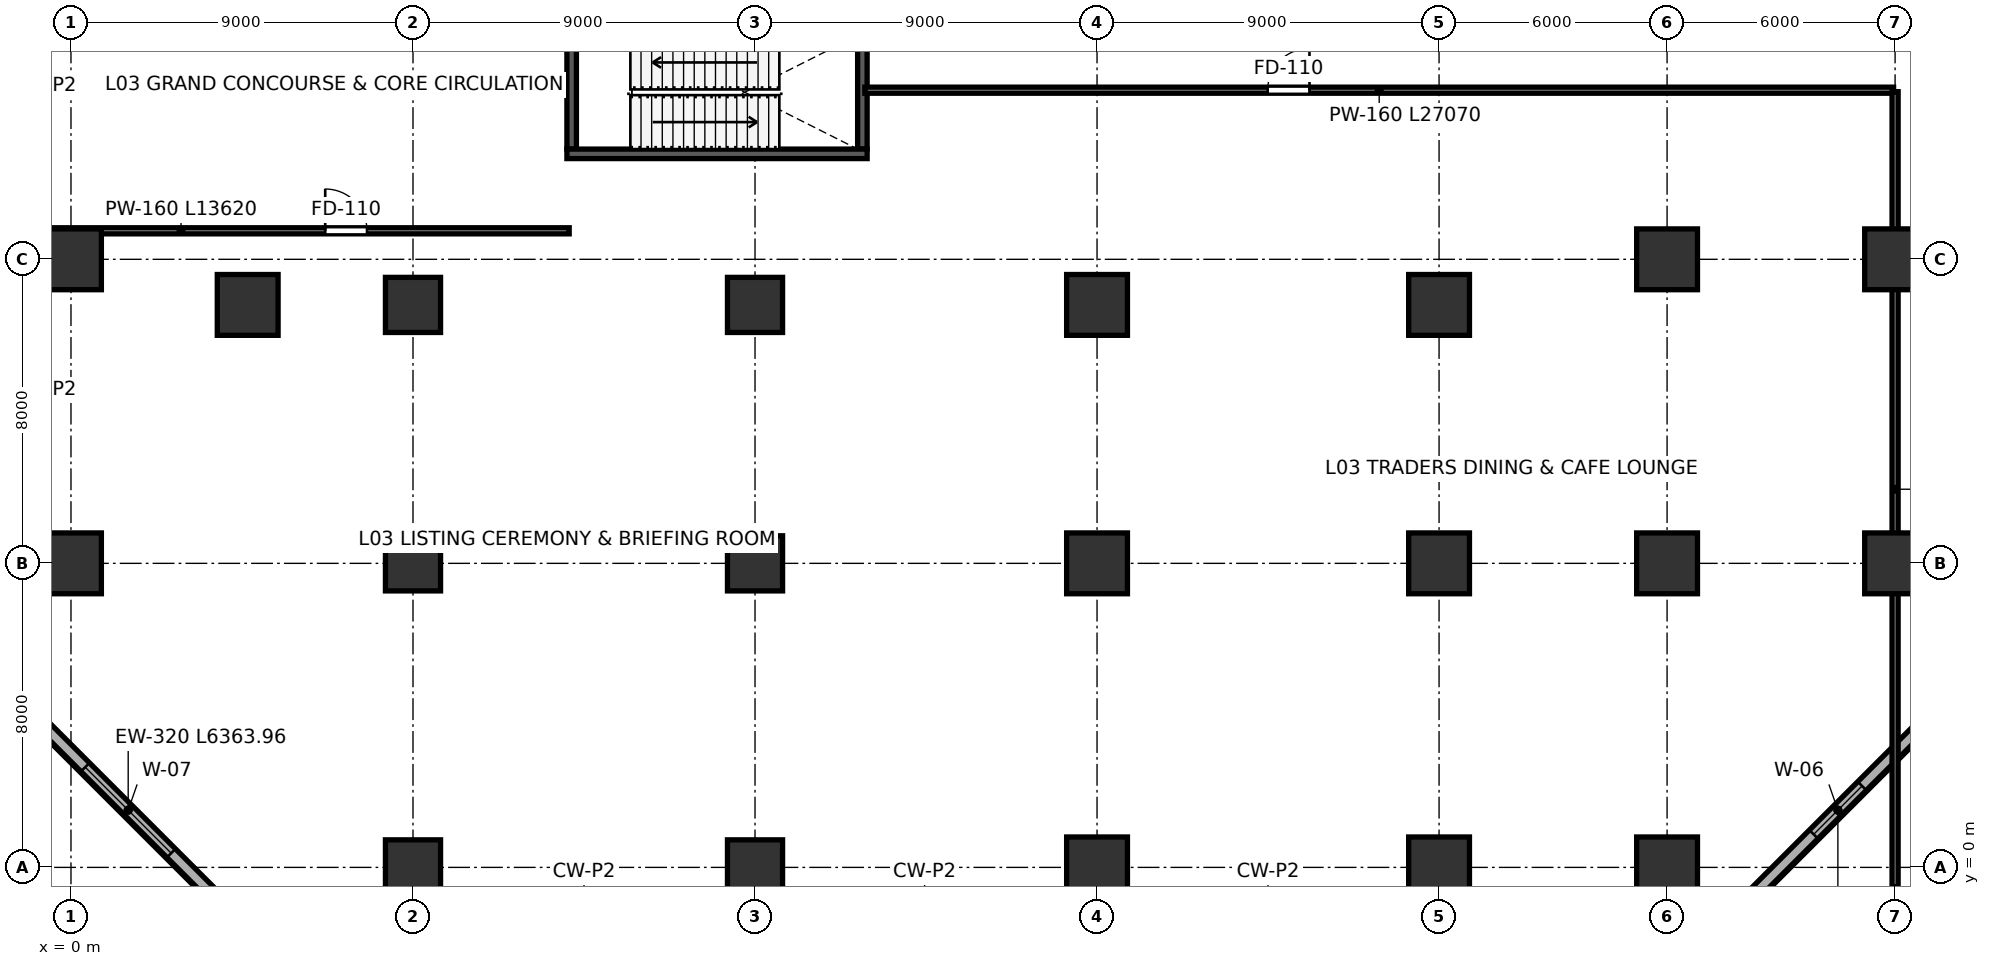
"""IFC4 building model, lengths in metres.
Left out: names, types, materials, properties, quantities, classifications, styles, units other than length and angle.
Written with IfcOpenShell. Run it as: python <this file> out.ifc"""

import sys

from ifc_helpers import new_model, si_unit, direction, frame, frame_2d, origin, origin_2d, place, context, subcontext, project, spatial, rectangle, extrude, source, transform, mapped, element, fill, save


model = new_model("IFC4")
c1 = context("Model", 3, precision=1e-05, world=origin(), true_north=direction((0.0, 1.0)))
c2 = subcontext(c1, "Body", "Model", "MODEL_VIEW")
j1 = project(units=[si_unit("LENGTHUNIT", "METRE"), si_unit("PLANEANGLEUNIT", "RADIAN")], contexts=[c1])
p1 = place(None, origin())
s1 = spatial("IfcSite", under=j1, at=p1, CompositionType="ELEMENT")
p2 = place(p1, origin())
s2 = spatial("IfcBuilding", under=s1, at=p2, CompositionType="ELEMENT")
p3 = place(p2, frame((0.0, 0.0, 12.0)))
s3 = spatial("IfcBuildingStorey", under=s2, at=p3, CompositionType="ELEMENT", Elevation=12.0)
m1 = source(origin(), c2, "Body", "SweptSolid", [
    extrude(rectangle(XDim=1.6, YDim=1.6, at=origin_2d()), origin(), (0.0, 0.0, 1.0), 5.398),
])
for number, where, z_axis, x_axis in (
    (1, (0.0, 8.0, 0.001), (0.0, 0.0, 1.0), (1.0, 0.0, 0.0)),
    (2, (0.0, 16.0, 0.001), (0.0, 0.0, 1.0), (1.0, 0.0, 0.0)),
):
    element("IfcColumn", number, at=place(p3, frame(where, z_axis=z_axis, x_axis=x_axis)), inside=s3, PredefinedType="COLUMN", context=c2, shape_type="MappedRepresentation", body=[
        mapped(m1, transform((0.0, 0.0, 0.0), scale=1.0)),
    ])
m2 = source(origin(), c2, "Body", "SweptSolid", [
    extrude(rectangle(XDim=1.45, YDim=1.45, at=origin_2d()), origin(), (0.0, 0.0, 1.0), 5.398),
])
p4 = place(p3, frame((9.0, 0.0, 0.001), z_axis=(0.0, 0.0, 1.0), x_axis=(1.0, 0.0, 0.0)))
e3 = element("IfcColumn", 3, at=p4, inside=s3, PredefinedType="COLUMN", context=c2, shape_type="MappedRepresentation", body=[
    mapped(m2, transform((0.0, 0.0, 0.0), scale=1.0)),
])
m3 = source(origin(), c2, "Body", "SweptSolid", [
    extrude(rectangle(XDim=1.45, YDim=1.45, at=origin_2d()), origin(), (0.0, 0.0, 1.0), 5.398),
])
for number, where, z_axis, x_axis in (
    (4, (9.0, 8.0, 0.001), (0.0, 0.0, 1.0), (1.0, 0.0, 0.0)),
    (5, (9.0, 14.8, 0.001), (0.0, 0.0, 1.0), (1.0, 0.0, 0.0)),
):
    element("IfcColumn", number, at=place(p3, frame(where, z_axis=z_axis, x_axis=x_axis)), inside=s3, PredefinedType="COLUMN", context=c2, shape_type="MappedRepresentation", body=[
        mapped(m3, transform((0.0, 0.0, 0.0), scale=1.0)),
    ])
p5 = place(p3, frame((18.0, 0.0, 0.001), z_axis=(0.0, 0.0, 1.0), x_axis=(1.0, 0.0, 0.0)))
e6 = element("IfcColumn", 6, at=p5, inside=s3, PredefinedType="COLUMN", context=c2, shape_type="MappedRepresentation", body=[
    mapped(m2, transform((0.0, 0.0, 0.0), scale=1.0)),
])
for number, where, z_axis, x_axis in (
    (7, (18.0, 8.0, 0.001), (0.0, 0.0, 1.0), (1.0, 0.0, 0.0)),
    (8, (18.0, 14.8, 0.001), (0.0, 0.0, 1.0), (1.0, 0.0, 0.0)),
):
    element("IfcColumn", number, at=place(p3, frame(where, z_axis=z_axis, x_axis=x_axis)), inside=s3, PredefinedType="COLUMN", context=c2, shape_type="MappedRepresentation", body=[
        mapped(m3, transform((0.0, 0.0, 0.0), scale=1.0)),
    ])
p6 = place(p3, frame((27.0, 0.0, 0.001), z_axis=(0.0, 0.0, 1.0), x_axis=(1.0, 0.0, 0.0)))
e9 = element("IfcColumn", 9, at=p6, inside=s3, PredefinedType="COLUMN", context=c2, shape_type="MappedRepresentation", body=[
    mapped(m1, transform((0.0, 0.0, 0.0), scale=1.0)),
])
m4 = source(origin(), c2, "Body", "SweptSolid", [
    extrude(rectangle(XDim=1.6, YDim=1.6, at=origin_2d()), origin(), (0.0, 0.0, 1.0), 5.398),
])
for number, where, z_axis, x_axis in (
    (10, (27.0, 8.0, 0.001), (0.0, 0.0, 1.0), (1.0, 0.0, 0.0)),
    (11, (27.0, 14.8, 0.001), (0.0, 0.0, 1.0), (1.0, 0.0, 0.0)),
):
    element("IfcColumn", number, at=place(p3, frame(where, z_axis=z_axis, x_axis=x_axis)), inside=s3, PredefinedType="COLUMN", context=c2, shape_type="MappedRepresentation", body=[
        mapped(m4, transform((0.0, 0.0, 0.0), scale=1.0)),
    ])
p7 = place(p3, frame((36.0, 0.0, 0.001), z_axis=(0.0, 0.0, 1.0), x_axis=(1.0, 0.0, 0.0)))
e12 = element("IfcColumn", 12, at=p7, inside=s3, PredefinedType="COLUMN", context=c2, shape_type="MappedRepresentation", body=[
    mapped(m1, transform((0.0, 0.0, 0.0), scale=1.0)),
])
for number, where, z_axis, x_axis in (
    (13, (36.0, 8.0, 0.001), (0.0, 0.0, 1.0), (1.0, 0.0, 0.0)),
    (14, (36.0, 14.8, 0.001), (0.0, 0.0, 1.0), (1.0, 0.0, 0.0)),
):
    element("IfcColumn", number, at=place(p3, frame(where, z_axis=z_axis, x_axis=x_axis)), inside=s3, PredefinedType="COLUMN", context=c2, shape_type="MappedRepresentation", body=[
        mapped(m4, transform((0.0, 0.0, 0.0), scale=1.0)),
    ])
p8 = place(p3, frame((42.0, 0.0, 0.001), z_axis=(0.0, 0.0, 1.0), x_axis=(1.0, 0.0, 0.0)))
e15 = element("IfcColumn", 15, at=p8, inside=s3, PredefinedType="COLUMN", context=c2, shape_type="MappedRepresentation", body=[
    mapped(m1, transform((0.0, 0.0, 0.0), scale=1.0)),
])
for number, where, z_axis, x_axis in (
    (16, (42.0, 8.0, 0.001), (0.0, 0.0, 1.0), (1.0, 0.0, 0.0)),
    (17, (42.0, 16.0, 0.001), (0.0, 0.0, 1.0), (1.0, 0.0, 0.0)),
):
    element("IfcColumn", number, at=place(p3, frame(where, z_axis=z_axis, x_axis=x_axis)), inside=s3, PredefinedType="COLUMN", context=c2, shape_type="MappedRepresentation", body=[
        mapped(m4, transform((0.0, 0.0, 0.0), scale=1.0)),
    ])
for number, where, z_axis, x_axis in (
    (18, (48.0, 8.0, 0.001), (0.0, 0.0, 1.0), (1.0, 0.0, 0.0)),
    (19, (48.0, 16.0, 0.001), (0.0, 0.0, 1.0), (1.0, 0.0, 0.0)),
):
    element("IfcColumn", number, at=place(p3, frame(where, z_axis=z_axis, x_axis=x_axis)), inside=s3, PredefinedType="COLUMN", context=c2, shape_type="MappedRepresentation", body=[
        mapped(m1, transform((0.0, 0.0, 0.0), scale=1.0)),
    ])
p9 = place(p3, frame((4.65, 14.8, 0.001), z_axis=(0.0, 0.0, 1.0), x_axis=(1.0, 0.0, 0.0)))
e20 = element("IfcColumn", 20, at=p9, inside=s3, PredefinedType="COLUMN", context=c2, shape_type="MappedRepresentation", body=[
    mapped(m4, transform((0.0, 0.0, 0.0), scale=1.0)),
])
p10 = place(p3, frame((44.244, -0.744, 0.0), z_axis=(0.0, 0.0, 1.0), x_axis=(0.707106781187, 0.707106781187, 0.0)))
e21 = element("IfcWall", 21, at=p10, inside=s3, PredefinedType="SOLIDWALL", context=c2, shape_type="SweptSolid", body=[
    extrude(rectangle(XDim=6.364, YDim=0.32, at=frame_2d((3.182, 0.0))), origin(), (0.0, 0.0, 1.0), 5.14),
])
p11 = place(p10, frame((2.282, 0.0, 0.65)))
e22 = element("IfcOpeningElement", 22, at=p11, cuts=e21, PredefinedType="OPENING", context=c2, shape_type="SweptSolid", body=[
    extrude(rectangle(XDim=1.8, YDim=2.1, at=frame_2d((0.9, 1.05))), frame((0.0, 0.17, 0.0), z_axis=(0.0, -1.0, 0.0), x_axis=(1.0, 0.0, 0.0)), (0.0, 0.0, 1.0), 0.34),
])
p12 = place(p3, frame((-0.744, 3.756, 0.0), z_axis=(0.0, 0.0, 1.0), x_axis=(0.707106781187, -0.707106781187, 0.0)))
e23 = element("IfcWall", 23, at=p12, inside=s3, PredefinedType="SOLIDWALL", context=c2, shape_type="SweptSolid", body=[
    extrude(rectangle(XDim=6.364, YDim=0.32, at=frame_2d((3.182, 0.0))), origin(), (0.0, 0.0, 1.0), 5.14),
])
p13 = place(p12, frame((1.582, 0.0, 0.65)))
e24 = element("IfcOpeningElement", 24, at=p13, cuts=e23, PredefinedType="OPENING", context=c2, shape_type="SweptSolid", body=[
    extrude(rectangle(XDim=3.2, YDim=2.5, at=frame_2d((1.6, 1.25))), frame((0.0, 0.17, 0.0), z_axis=(0.0, -1.0, 0.0), x_axis=(1.0, 0.0, 0.0)), (0.0, 0.0, 1.0), 0.34),
])
for number, where, z_axis, x_axis in (
    (25, (13.175, 18.9, 0.0), (0.0, 0.0, 1.0), (0.0, 1.0, 0.0)),
    (26, (20.825, 18.9, 0.0), (0.0, 0.0, 1.0), (0.0, 1.0, 0.0)),
):
    element("IfcWall", number, at=place(p3, frame(where, z_axis=z_axis, x_axis=x_axis)), inside=s3, PredefinedType="SHEAR", context=c2, shape_type="SweptSolid", body=[
        extrude(rectangle(XDim=2.99, YDim=0.25, at=frame_2d((1.495, 0.0))), origin(), (0.0, 0.0, 1.0), 5.14),
    ])
p14 = place(p3, frame((13.05, 18.775, 0.0), z_axis=(0.0, 0.0, 1.0), x_axis=(1.0, 0.0, 0.0)))
e27 = element("IfcWall", 27, at=p14, inside=s3, PredefinedType="SHEAR", context=c2, shape_type="SweptSolid", body=[
    extrude(rectangle(XDim=7.9, YDim=0.25, at=frame_2d((3.95, 0.0))), origin(), (0.0, 0.0, 1.0), 5.14),
])
p15 = place(p3, frame((-0.51, 16.75, 0.0), z_axis=(0.0, 0.0, 1.0), x_axis=(1.0, 0.0, 0.0)))
e28 = element("IfcWall", 28, at=p15, inside=s3, PredefinedType="PARTITIONING", context=c2, shape_type="SweptSolid", body=[
    extrude(rectangle(XDim=13.62, YDim=0.16, at=frame_2d((6.81, 0.0))), origin(), (0.0, 0.0, 1.0), 4.27),
])
p16 = place(p15, frame((7.2, 0.0, 0.0)))
e29 = element("IfcOpeningElement", 29, at=p16, cuts=e28, PredefinedType="OPENING", context=c2, shape_type="SweptSolid", body=[
    extrude(rectangle(XDim=1.1, YDim=2.2, at=frame_2d((0.55, 1.1))), frame((0.0, 0.09, 0.0), z_axis=(0.0, -1.0, 0.0), x_axis=(1.0, 0.0, 0.0)), (0.0, 0.0, 1.0), 0.18),
])
p17 = place(p3, frame((20.89, 20.45, 0.0), z_axis=(0.0, 0.0, 1.0), x_axis=(1.0, 0.0, 0.0)))
e30 = element("IfcWall", 30, at=p17, inside=s3, PredefinedType="PARTITIONING", context=c2, shape_type="SweptSolid", body=[
    extrude(rectangle(XDim=27.07, YDim=0.16, at=frame_2d((13.535, 0.0))), origin(), (0.0, 0.0, 1.0), 4.27),
])
p18 = place(p17, frame((10.6, 0.0, 0.0)))
e31 = element("IfcOpeningElement", 31, at=p18, cuts=e30, PredefinedType="OPENING", context=c2, shape_type="SweptSolid", body=[
    extrude(rectangle(XDim=1.1, YDim=2.2, at=frame_2d((0.55, 1.1))), frame((0.0, 0.09, 0.0), z_axis=(0.0, -1.0, 0.0), x_axis=(1.0, 0.0, 0.0)), (0.0, 0.0, 1.0), 0.18),
])
p19 = place(p3, frame((48.0, -0.51, 0.0), z_axis=(0.0, 0.0, 1.0), x_axis=(0.0, 1.0, 0.0)))
e32 = element("IfcWall", 32, at=p19, inside=s3, PredefinedType="PARTITIONING", context=c2, shape_type="SweptSolid", body=[
    extrude(rectangle(XDim=20.92, YDim=0.16, at=frame_2d((10.46, 0.0))), origin(), (0.0, 0.0, 1.0), 4.275),
])
m5 = source(origin(), c2, "Body", "SweptSolid", [
    extrude(rectangle(XDim=1.8, YDim=2.1, at=frame_2d((0.9, 1.05))), frame((0.0, 0.03, 0.0), z_axis=(0.0, -1.0, 0.0), x_axis=(1.0, 0.0, 0.0)), (0.0, 0.0, 1.0), 0.06),
])
p20 = place(p11, origin())
e33 = element("IfcWindow", 33, at=p20, inside=s3, PartitioningType="SINGLE_PANEL", PredefinedType="WINDOW", context=c2, shape_type="MappedRepresentation", body=[
    mapped(m5, transform((0.0, 0.0, 0.0), scale=1.0)),
])
fill(e22, e33)
m6 = source(origin(), c2, "Body", "SweptSolid", [
    extrude(rectangle(XDim=3.2, YDim=2.5, at=frame_2d((1.6, 1.25))), frame((0.0, 0.03, 0.0), z_axis=(0.0, -1.0, 0.0), x_axis=(1.0, 0.0, 0.0)), (0.0, 0.0, 1.0), 0.06),
])
p21 = place(p13, origin())
e34 = element("IfcWindow", 34, at=p21, inside=s3, PartitioningType="TRIPLE_PANEL_VERTICAL", PredefinedType="WINDOW", context=c2, shape_type="MappedRepresentation", body=[
    mapped(m6, transform((0.0, 0.0, 0.0), scale=1.0)),
])
fill(e24, e34)
m7 = source(origin(), c2, "Body", "SweptSolid", [
    extrude(rectangle(XDim=1.1, YDim=2.2, at=frame_2d((0.55, 1.1))), frame((0.0, 0.025, 0.0), z_axis=(0.0, -1.0, 0.0), x_axis=(1.0, 0.0, 0.0)), (0.0, 0.0, 1.0), 0.05),
])
p22 = place(p16, origin())
e35 = element("IfcDoor", 35, at=p22, inside=s3, OperationType="SINGLE_SWING_LEFT", PredefinedType="DOOR", context=c2, shape_type="MappedRepresentation", body=[
    mapped(m7, transform((0.0, 0.0, 0.0), scale=1.0)),
])
fill(e29, e35)
p23 = place(p18, origin())
e36 = element("IfcDoor", 36, at=p23, inside=s3, OperationType="SINGLE_SWING_RIGHT", PredefinedType="DOOR", context=c2, shape_type="MappedRepresentation", body=[
    mapped(m7, transform((0.0, 0.0, 0.0), scale=1.0)),
])
fill(e31, e36)
save(model, sys.argv[1])
